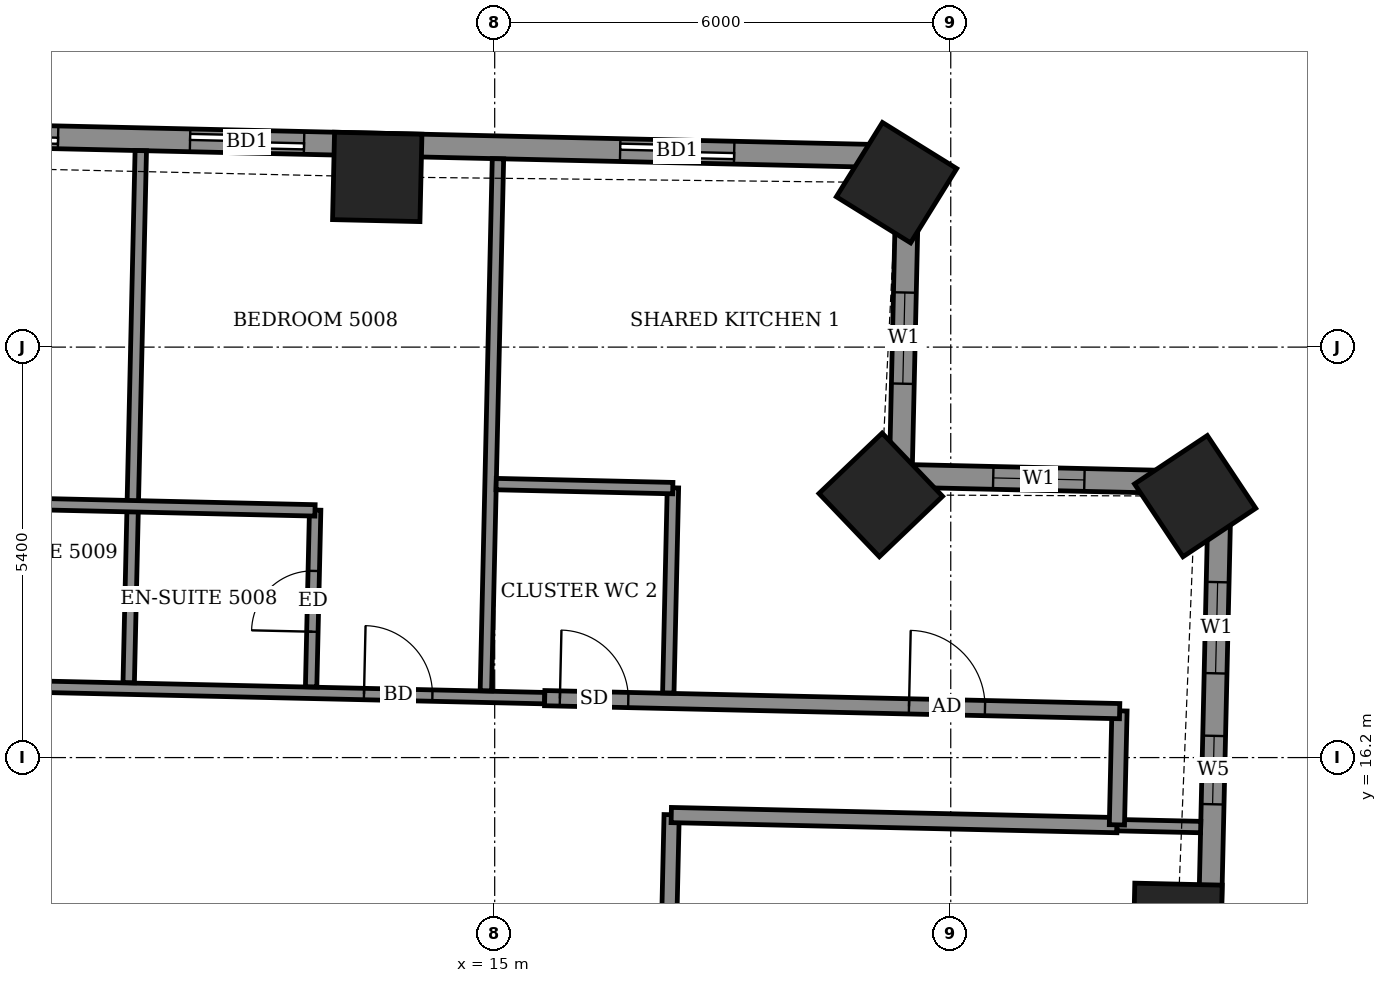
"""IFC4 building model, lengths in metres.
Left out: names, types, materials, properties, quantities, classifications, styles, units other than length and angle.
Written with IfcOpenShell. Run it as: python <this file> out.ifc"""

import sys

from ifc_helpers import new_model, si_unit, direction, frame, frame_2d, origin, origin_2d, place, context, subcontext, project, spatial, rectangle, extrude, element, fill, save


model = new_model("IFC4")
c1 = context("Model", 3, precision=1e-05, world=origin(), true_north=direction((0.0, 1.0)))
c2 = subcontext(c1, "Body", "Model", "MODEL_VIEW")
j1 = project(units=[si_unit("LENGTHUNIT", "METRE"), si_unit("PLANEANGLEUNIT", "RADIAN")], contexts=[c1])
p1 = place(None, origin())
s1 = spatial("IfcSite", under=j1, at=p1, CompositionType="ELEMENT")
p2 = place(p1, origin())
s2 = spatial("IfcBuilding", under=s1, at=p2, CompositionType="ELEMENT")
p3 = place(p2, frame((0.0, 0.0, 197.9)))
s3 = spatial("IfcBuildingStorey", under=s2, at=p3, CompositionType="ELEMENT", Elevation=197.9)
for number, where, z_axis, x_axis in (
    (1, (23.983, 13.96, -0.55), (0.0, 0.0, 1.0), (0.023, 1.0, 0.0)),
    (2, (24.215, 19.639, -0.55), (0.0, 0.0, 1.0), (-0.554, 0.833, 0.0)),
    (3, (20.079, 19.656, -0.55), (0.0, 0.0, 1.0), (-0.691, 0.723, 0.0)),
    (4, (20.287, 23.763, -0.55), (0.0, 0.0, 1.0), (-0.85, 0.527, 0.0)),
    (5, (13.455, 23.839, -0.55), (0.0, 0.0, 1.0), (-1.0, 0.023, 0.0)),
):
    element("IfcColumn", number, at=place(p3, frame(where, z_axis=z_axis, x_axis=x_axis)), inside=s3, PredefinedType="COLUMN", context=c2, shape_type="SweptSolid", body=[
        extrude(rectangle(XDim=1.15, YDim=1.15, at=origin_2d()), origin(), (0.0, 0.0, 1.0), 3.6),
    ])
p4 = place(p3, frame((24.27, 7.885, 0.0), z_axis=(0.0, 0.0, 1.0), x_axis=(0.022715362207, 0.999741972871, 0.0)))
e6 = element("IfcWall", 6, at=p4, inside=s3, PredefinedType="SOLIDWALL", context=c2, shape_type="SweptSolid", body=[
    extrude(rectangle(XDim=11.93, YDim=0.3, at=frame_2d((5.965, 0.0))), origin(), (0.0, 0.0, 1.0), 3.05),
])
p5 = place(p4, frame((2.311, 0.0, 0.0)))
e7 = element("IfcOpeningElement", 7, at=p5, cuts=e6, PredefinedType="OPENING", context=c2, shape_type="SweptSolid", body=[
    extrude(rectangle(XDim=1.5, YDim=2.4, at=frame_2d((0.75, 1.2))), frame((0.0, 0.16, 0.0), z_axis=(0.0, -1.0, 0.0), x_axis=(1.0, 0.0, 0.0)), (0.0, 0.0, 1.0), 0.32),
])
p6 = place(p4, frame((7.703, 0.0, 0.9)))
e8 = element("IfcOpeningElement", 8, at=p6, cuts=e6, PredefinedType="OPENING", context=c2, shape_type="SweptSolid", body=[
    extrude(rectangle(XDim=0.9, YDim=1.5, at=frame_2d((0.45, 0.75))), frame((0.0, 0.16, 0.0), z_axis=(0.0, -1.0, 0.0), x_axis=(1.0, 0.0, 0.0)), (0.0, 0.0, 1.0), 0.32),
])
p7 = place(p4, frame((9.426, 0.0, 0.9)))
e9 = element("IfcOpeningElement", 9, at=p7, cuts=e6, PredefinedType="OPENING", context=c2, shape_type="SweptSolid", body=[
    extrude(rectangle(XDim=1.2, YDim=1.5, at=frame_2d((0.6, 0.75))), frame((0.0, 0.16, 0.0), z_axis=(0.0, -1.0, 0.0), x_axis=(1.0, 0.0, 0.0)), (0.0, 0.0, 1.0), 0.32),
])
p8 = place(p3, frame((24.541, 19.812, 0.0), z_axis=(0.0, 0.0, 1.0), x_axis=(-0.999744320311, 0.022611811187, 0.0)))
e10 = element("IfcWall", 10, at=p8, inside=s3, PredefinedType="SOLIDWALL", context=c2, shape_type="SweptSolid", body=[
    extrude(rectangle(XDim=4.2, YDim=0.3, at=frame_2d((2.1, 0.0))), origin(), (0.0, 0.0, 1.0), 2.55),
])
p9 = place(p8, frame((1.783, 0.0, 0.9)))
e11 = element("IfcOpeningElement", 11, at=p9, cuts=e10, PredefinedType="OPENING", context=c2, shape_type="SweptSolid", body=[
    extrude(rectangle(XDim=1.2, YDim=1.5, at=frame_2d((0.6, 0.75))), frame((0.0, 0.16, 0.0), z_axis=(0.0, -1.0, 0.0), x_axis=(1.0, 0.0, 0.0)), (0.0, 0.0, 1.0), 0.32),
])
p10 = place(p3, frame((20.342, 19.907, 0.0), z_axis=(0.0, 0.0, 1.0), x_axis=(0.022611811187, 0.999744320311, 0.0)))
e12 = element("IfcWall", 12, at=p10, inside=s3, PredefinedType="SOLIDWALL", context=c2, shape_type="SweptSolid", body=[
    extrude(rectangle(XDim=4.2, YDim=0.3, at=frame_2d((2.1, 0.0))), origin(), (0.0, 0.0, 1.0), 2.55),
])
p11 = place(p10, frame((1.212, 0.0, 0.9)))
e13 = element("IfcOpeningElement", 13, at=p11, cuts=e12, PredefinedType="OPENING", context=c2, shape_type="SweptSolid", body=[
    extrude(rectangle(XDim=1.2, YDim=1.5, at=frame_2d((0.6, 0.75))), frame((0.0, 0.16, 0.0), z_axis=(0.0, -1.0, 0.0), x_axis=(1.0, 0.0, 0.0)), (0.0, 0.0, 1.0), 0.32),
])
p12 = place(p3, frame((20.437, 24.106, 0.0), z_axis=(0.0, 0.0, 1.0), x_axis=(-0.999742506232, 0.022691875925, 0.0)))
e14 = element("IfcWall", 14, at=p12, inside=s3, PredefinedType="SOLIDWALL", context=c2, shape_type="SweptSolid", body=[
    extrude(rectangle(XDim=42.444, YDim=0.3, at=frame_2d((21.222, 0.0))), origin(), (0.0, 0.0, 1.0), 3.05),
])
p13 = place(p12, frame((2.287, 0.0, 0.0)))
e15 = element("IfcOpeningElement", 15, at=p13, cuts=e14, PredefinedType="OPENING", context=c2, shape_type="SweptSolid", body=[
    extrude(rectangle(XDim=1.5, YDim=2.4, at=frame_2d((0.75, 1.2))), frame((0.0, 0.16, 0.0), z_axis=(0.0, -1.0, 0.0), x_axis=(1.0, 0.0, 0.0)), (0.0, 0.0, 1.0), 0.32),
])
p14 = place(p12, frame((7.947, 0.0, 0.0)))
e16 = element("IfcOpeningElement", 16, at=p14, cuts=e14, PredefinedType="OPENING", context=c2, shape_type="SweptSolid", body=[
    extrude(rectangle(XDim=1.5, YDim=2.4, at=frame_2d((0.75, 1.2))), frame((0.0, 0.16, 0.0), z_axis=(0.0, -1.0, 0.0), x_axis=(1.0, 0.0, 0.0)), (0.0, 0.0, 1.0), 0.32),
])
p15 = place(p12, frame((11.184, 0.0, 0.0)))
e17 = element("IfcOpeningElement", 17, at=p15, cuts=e14, PredefinedType="OPENING", context=c2, shape_type="SweptSolid", body=[
    extrude(rectangle(XDim=1.5, YDim=2.4, at=frame_2d((0.75, 1.2))), frame((0.0, 0.16, 0.0), z_axis=(0.0, -1.0, 0.0), x_axis=(1.0, 0.0, 0.0)), (0.0, 0.0, 1.0), 0.32),
])
p16 = place(p12, frame((16.469, 0.0, 0.0)))
e18 = element("IfcOpeningElement", 18, at=p16, cuts=e14, PredefinedType="OPENING", context=c2, shape_type="SweptSolid", body=[
    extrude(rectangle(XDim=1.5, YDim=2.4, at=frame_2d((0.75, 1.2))), frame((0.0, 0.16, 0.0), z_axis=(0.0, -1.0, 0.0), x_axis=(1.0, 0.0, 0.0)), (0.0, 0.0, 1.0), 0.32),
])
p17 = place(p12, frame((22.02, 0.0, 0.0)))
e19 = element("IfcOpeningElement", 19, at=p17, cuts=e14, PredefinedType="OPENING", context=c2, shape_type="SweptSolid", body=[
    extrude(rectangle(XDim=1.5, YDim=2.4, at=frame_2d((0.75, 1.2))), frame((0.0, 0.16, 0.0), z_axis=(0.0, -1.0, 0.0), x_axis=(1.0, 0.0, 0.0)), (0.0, 0.0, 1.0), 0.32),
])
p18 = place(p12, frame((25.257, 0.0, 0.0)))
e20 = element("IfcOpeningElement", 20, at=p18, cuts=e14, PredefinedType="OPENING", context=c2, shape_type="SweptSolid", body=[
    extrude(rectangle(XDim=1.5, YDim=2.4, at=frame_2d((0.75, 1.2))), frame((0.0, 0.16, 0.0), z_axis=(0.0, -1.0, 0.0), x_axis=(1.0, 0.0, 0.0)), (0.0, 0.0, 1.0), 0.32),
])
p19 = place(p12, frame((30.057, 0.0, 0.0)))
e21 = element("IfcOpeningElement", 21, at=p19, cuts=e14, PredefinedType="OPENING", context=c2, shape_type="SweptSolid", body=[
    extrude(rectangle(XDim=1.5, YDim=2.4, at=frame_2d((0.75, 1.2))), frame((0.0, 0.16, 0.0), z_axis=(0.0, -1.0, 0.0), x_axis=(1.0, 0.0, 0.0)), (0.0, 0.0, 1.0), 0.32),
])
p20 = place(p12, frame((33.294, 0.0, 0.0)))
e22 = element("IfcOpeningElement", 22, at=p20, cuts=e14, PredefinedType="OPENING", context=c2, shape_type="SweptSolid", body=[
    extrude(rectangle(XDim=1.5, YDim=2.4, at=frame_2d((0.75, 1.2))), frame((0.0, 0.16, 0.0), z_axis=(0.0, -1.0, 0.0), x_axis=(1.0, 0.0, 0.0)), (0.0, 0.0, 1.0), 0.32),
])
p21 = place(p12, frame((38.484, 0.0, 0.9)))
e23 = element("IfcOpeningElement", 23, at=p21, cuts=e14, PredefinedType="OPENING", context=c2, shape_type="SweptSolid", body=[
    extrude(rectangle(XDim=2.4, YDim=1.5, at=frame_2d((1.2, 0.75))), frame((0.0, 0.16, 0.0), z_axis=(0.0, -1.0, 0.0), x_axis=(1.0, 0.0, 0.0)), (0.0, 0.0, 1.0), 0.32),
])
p22 = place(p3, frame((17.154, 7.786, 0.0), z_axis=(0.0, 0.0, 1.0), x_axis=(0.022680883318, 0.999742755679, 0.0)))
e24 = element("IfcWall", 24, at=p22, inside=s3, PredefinedType="PARTITIONING", context=c2, shape_type="SweptSolid", body=[
    extrude(rectangle(XDim=7.664, YDim=0.2, at=frame_2d((3.832, 0.0))), origin(), (0.0, 0.0, 1.0), 3.05),
])
p23 = place(p22, frame((3.434, 0.0, 0.0)))
e25 = element("IfcOpeningElement", 25, at=p23, cuts=e24, PredefinedType="OPENING", context=c2, shape_type="SweptSolid", body=[
    extrude(rectangle(XDim=1.0, YDim=2.1, at=frame_2d((0.5, 1.05))), frame((0.0, 0.11, 0.0), z_axis=(0.0, -1.0, 0.0), x_axis=(1.0, 0.0, 0.0)), (0.0, 0.0, 1.0), 0.22),
])
p24 = place(p3, frame((17.323, 15.444, 0.0), z_axis=(0.0, 0.0, 1.0), x_axis=(0.999742758565, -0.022680756085, 0.0)))
e26 = element("IfcWall", 26, at=p24, inside=s3, PredefinedType="PARTITIONING", context=c2, shape_type="SweptSolid", body=[
    extrude(rectangle(XDim=5.866, YDim=0.2, at=frame_2d((2.933, 0.0))), origin(), (0.0, 0.0, 1.0), 3.05),
])
p25 = place(p3, frame((23.188, 15.311, 0.0), z_axis=(0.0, 0.0, 1.0), x_axis=(0.999738848859, -0.022852441507, 0.0)))
e27 = element("IfcWall", 27, at=p25, inside=s3, PredefinedType="PARTITIONING", context=c2, shape_type="SweptSolid", body=[
    extrude(rectangle(XDim=1.1, YDim=0.15, at=frame_2d((0.55, 0.0))), origin(), (0.0, 0.0, 1.0), 2.55),
])
p26 = place(p3, frame((23.186, 15.315, 0.0), z_axis=(0.0, 0.0, 1.0), x_axis=(0.022617910375, 0.999744182344, 0.0)))
e28 = element("IfcWall", 28, at=p26, inside=s3, PredefinedType="PARTITIONING", context=c2, shape_type="SweptSolid", body=[
    extrude(rectangle(XDim=1.5, YDim=0.2, at=frame_2d((0.75, 0.0))), origin(), (0.0, 0.0, 1.0), 3.05),
])
p27 = place(p3, frame((-14.871, 17.675, 0.0), z_axis=(0.0, 0.0, 1.0), x_axis=(0.999742359486, -0.02269834024, 0.0)))
e29 = element("IfcWall", 29, at=p27, inside=s3, PredefinedType="PARTITIONING", context=c2, shape_type="SweptSolid", body=[
    extrude(rectangle(XDim=30.536, YDim=0.15, at=frame_2d((15.268, 0.0))), origin(), (0.0, 0.0, 1.0), 3.05),
])
p28 = place(p27, frame((28.159, 0.0, 0.0)))
e30 = element("IfcOpeningElement", 30, at=p28, cuts=e29, PredefinedType="OPENING", context=c2, shape_type="SweptSolid", body=[
    extrude(rectangle(XDim=0.9, YDim=2.1, at=frame_2d((0.45, 1.05))), frame((0.0, 0.085, 0.0), z_axis=(0.0, -1.0, 0.0), x_axis=(1.0, 0.0, 0.0)), (0.0, 0.0, 1.0), 0.17),
])
p29 = place(p27, frame((21.034, 0.0, 0.0)))
e31 = element("IfcOpeningElement", 31, at=p29, cuts=e29, PredefinedType="OPENING", context=c2, shape_type="SweptSolid", body=[
    extrude(rectangle(XDim=0.9, YDim=2.1, at=frame_2d((0.45, 1.05))), frame((0.0, 0.085, 0.0), z_axis=(0.0, -1.0, 0.0), x_axis=(1.0, 0.0, 0.0)), (0.0, 0.0, 1.0), 0.17),
])
p30 = place(p27, frame((18.684, 0.0, 0.0)))
e32 = element("IfcOpeningElement", 32, at=p30, cuts=e29, PredefinedType="OPENING", context=c2, shape_type="SweptSolid", body=[
    extrude(rectangle(XDim=0.9, YDim=2.1, at=frame_2d((0.45, 1.05))), frame((0.0, 0.085, 0.0), z_axis=(0.0, -1.0, 0.0), x_axis=(1.0, 0.0, 0.0)), (0.0, 0.0, 1.0), 0.17),
])
p31 = place(p27, frame((11.709, 0.0, 0.0)))
e33 = element("IfcOpeningElement", 33, at=p31, cuts=e29, PredefinedType="OPENING", context=c2, shape_type="SweptSolid", body=[
    extrude(rectangle(XDim=0.9, YDim=2.1, at=frame_2d((0.45, 1.05))), frame((0.0, 0.085, 0.0), z_axis=(0.0, -1.0, 0.0), x_axis=(1.0, 0.0, 0.0)), (0.0, 0.0, 1.0), 0.17),
])
p32 = place(p27, frame((9.734, 0.0, 0.0)))
e34 = element("IfcOpeningElement", 34, at=p32, cuts=e29, PredefinedType="OPENING", context=c2, shape_type="SweptSolid", body=[
    extrude(rectangle(XDim=0.9, YDim=2.1, at=frame_2d((0.45, 1.05))), frame((0.0, 0.085, 0.0), z_axis=(0.0, -1.0, 0.0), x_axis=(1.0, 0.0, 0.0)), (0.0, 0.0, 1.0), 0.17),
])
p33 = place(p27, frame((2.859, 0.0, 0.0)))
e35 = element("IfcOpeningElement", 35, at=p33, cuts=e29, PredefinedType="OPENING", context=c2, shape_type="SweptSolid", body=[
    extrude(rectangle(XDim=0.9, YDim=2.1, at=frame_2d((0.45, 1.05))), frame((0.0, 0.085, 0.0), z_axis=(0.0, -1.0, 0.0), x_axis=(1.0, 0.0, 0.0)), (0.0, 0.0, 1.0), 0.17),
])
p34 = place(p27, frame((0.584, 0.0, 0.0)))
e36 = element("IfcOpeningElement", 36, at=p34, cuts=e29, PredefinedType="OPENING", context=c2, shape_type="SweptSolid", body=[
    extrude(rectangle(XDim=0.9, YDim=2.1, at=frame_2d((0.45, 1.05))), frame((0.0, 0.085, 0.0), z_axis=(0.0, -1.0, 0.0), x_axis=(1.0, 0.0, 0.0)), (0.0, 0.0, 1.0), 0.17),
])
p35 = place(p3, frame((15.658, 16.982, 0.0), z_axis=(0.0, 0.0, 1.0), x_axis=(0.99974485859, -0.022587999516, 0.0)))
e37 = element("IfcWall", 37, at=p35, inside=s3, PredefinedType="PARTITIONING", context=c2, shape_type="SweptSolid", body=[
    extrude(rectangle(XDim=7.566, YDim=0.2, at=frame_2d((3.783, 0.0))), origin(), (0.0, 0.0, 1.0), 3.05),
])
p36 = place(p35, frame((4.794, 0.0, 0.0)))
e38 = element("IfcOpeningElement", 38, at=p36, cuts=e37, PredefinedType="OPENING", context=c2, shape_type="SweptSolid", body=[
    extrude(rectangle(XDim=1.0, YDim=2.1, at=frame_2d((0.5, 1.05))), frame((0.0, 0.11, 0.0), z_axis=(0.0, -1.0, 0.0), x_axis=(1.0, 0.0, 0.0)), (0.0, 0.0, 1.0), 0.22),
])
p37 = place(p35, frame((0.2, 0.0, 0.0)))
e39 = element("IfcOpeningElement", 39, at=p37, cuts=e37, PredefinedType="OPENING", context=c2, shape_type="SweptSolid", body=[
    extrude(rectangle(XDim=0.9, YDim=2.1, at=frame_2d((0.45, 1.05))), frame((0.0, 0.11, 0.0), z_axis=(0.0, -1.0, 0.0), x_axis=(1.0, 0.0, 0.0)), (0.0, 0.0, 1.0), 0.22),
])
p38 = place(p3, frame((10.185, 17.186, 0.0), z_axis=(0.0, 0.0, 1.0), x_axis=(0.022702393474, 0.999742267452, 0.0)))
e40 = element("IfcWall", 40, at=p38, inside=s3, PredefinedType="PARTITIONING", context=c2, shape_type="SweptSolid", body=[
    extrude(rectangle(XDim=7.001, YDim=0.15, at=frame_2d((3.5, 0.0))), origin(), (0.0, 0.0, 1.0), 2.55),
])
p39 = place(p3, frame((12.585, 17.131, 0.0), z_axis=(0.0, 0.0, 1.0), x_axis=(0.022781023197, 0.999740478815, 0.0)))
e41 = element("IfcWall", 41, at=p39, inside=s3, PredefinedType="PARTITIONING", context=c2, shape_type="SweptSolid", body=[
    extrude(rectangle(XDim=2.325, YDim=0.15, at=frame_2d((1.163, 0.0))), origin(), (0.0, 0.0, 1.0), 3.05),
])
p40 = place(p39, frame((0.725, 0.0, 0.0)))
e42 = element("IfcOpeningElement", 42, at=p40, cuts=e41, PredefinedType="OPENING", context=c2, shape_type="SweptSolid", body=[
    extrude(rectangle(XDim=0.8, YDim=2.1, at=frame_2d((0.4, 1.05))), frame((0.0, 0.085, 0.0), z_axis=(0.0, -1.0, 0.0), x_axis=(1.0, 0.0, 0.0)), (0.0, 0.0, 1.0), 0.17),
])
p41 = place(p3, frame((14.884, 17.079, 0.0), z_axis=(0.0, 0.0, 1.0), x_axis=(0.022703185001, 0.999742249478, 0.0)))
e43 = element("IfcWall", 43, at=p41, inside=s3, PredefinedType="PARTITIONING", context=c2, shape_type="SweptSolid", body=[
    extrude(rectangle(XDim=7.0, YDim=0.15, at=frame_2d((3.5, 0.0))), origin(), (0.0, 0.0, 1.0), 2.55),
])
p42 = place(p3, frame((17.284, 17.05, 0.0), z_axis=(0.0, 0.0, 1.0), x_axis=(0.02260842146, 0.999744396973, 0.0)))
e44 = element("IfcWall", 44, at=p42, inside=s3, PredefinedType="PARTITIONING", context=c2, shape_type="SweptSolid", body=[
    extrude(rectangle(XDim=2.7, YDim=0.15, at=frame_2d((1.35, 0.0))), origin(), (0.0, 0.0, 1.0), 3.05),
])
p43 = place(p3, frame((7.837, 19.561, 0.0), z_axis=(0.0, 0.0, 1.0), x_axis=(0.99974154664, -0.022734113616, 0.0)))
e45 = element("IfcWall", 45, at=p43, inside=s3, PredefinedType="PARTITIONING", context=c2, shape_type="SweptSolid", body=[
    extrude(rectangle(XDim=4.8, YDim=0.15, at=frame_2d((2.4, 0.0))), origin(), (0.0, 0.0, 1.0), 3.05),
])
p44 = place(p3, frame((15.019, 19.798, 0.0), z_axis=(0.0, 0.0, 1.0), x_axis=(0.999740260747, -0.02279059109, 0.0)))
e46 = element("IfcWall", 46, at=p44, inside=s3, PredefinedType="PARTITIONING", context=c2, shape_type="SweptSolid", body=[
    extrude(rectangle(XDim=2.324, YDim=0.15, at=frame_2d((1.162, 0.0))), origin(), (0.0, 0.0, 1.0), 3.05),
])
p45 = place(p6, origin())
e47 = element("IfcWindow", 47, at=p45, inside=s3, PartitioningType="SINGLE_PANEL", PredefinedType="WINDOW", context=c2, shape_type="SweptSolid", body=[
    extrude(rectangle(XDim=0.9, YDim=1.5, at=frame_2d((0.45, 0.75))), frame((0.0, 0.03, 0.0), z_axis=(0.0, -1.0, 0.0), x_axis=(1.0, 0.0, 0.0)), (0.0, 0.0, 1.0), 0.06),
])
fill(e8, e47)
p46 = place(p7, origin())
e48 = element("IfcWindow", 48, at=p46, inside=s3, PartitioningType="SINGLE_PANEL", PredefinedType="WINDOW", context=c2, shape_type="SweptSolid", body=[
    extrude(rectangle(XDim=1.2, YDim=1.5, at=frame_2d((0.6, 0.75))), frame((0.0, 0.03, 0.0), z_axis=(0.0, -1.0, 0.0), x_axis=(1.0, 0.0, 0.0)), (0.0, 0.0, 1.0), 0.06),
])
fill(e9, e48)
p47 = place(p9, origin())
e49 = element("IfcWindow", 49, at=p47, inside=s3, PartitioningType="SINGLE_PANEL", PredefinedType="WINDOW", context=c2, shape_type="SweptSolid", body=[
    extrude(rectangle(XDim=1.2, YDim=1.5, at=frame_2d((0.6, 0.75))), frame((0.0, 0.03, 0.0), z_axis=(0.0, -1.0, 0.0), x_axis=(1.0, 0.0, 0.0)), (0.0, 0.0, 1.0), 0.06),
])
fill(e11, e49)
p48 = place(p11, origin())
e50 = element("IfcWindow", 50, at=p48, inside=s3, PartitioningType="SINGLE_PANEL", PredefinedType="WINDOW", context=c2, shape_type="SweptSolid", body=[
    extrude(rectangle(XDim=1.2, YDim=1.5, at=frame_2d((0.6, 0.75))), frame((0.0, 0.03, 0.0), z_axis=(0.0, -1.0, 0.0), x_axis=(1.0, 0.0, 0.0)), (0.0, 0.0, 1.0), 0.06),
])
fill(e13, e50)
p49 = place(p13, origin())
e51 = element("IfcDoor", 51, at=p49, inside=s3, OperationType="SLIDING_TO_LEFT", PredefinedType="DOOR", context=c2, shape_type="SweptSolid", body=[
    extrude(rectangle(XDim=1.5, YDim=2.4, at=frame_2d((0.75, 1.2))), frame((0.0, 0.025, 0.0), z_axis=(0.0, -1.0, 0.0), x_axis=(1.0, 0.0, 0.0)), (0.0, 0.0, 1.0), 0.05),
])
fill(e15, e51)
p50 = place(p14, origin())
e52 = element("IfcDoor", 52, at=p50, inside=s3, OperationType="SLIDING_TO_LEFT", PredefinedType="DOOR", context=c2, shape_type="SweptSolid", body=[
    extrude(rectangle(XDim=1.5, YDim=2.4, at=frame_2d((0.75, 1.2))), frame((0.0, 0.025, 0.0), z_axis=(0.0, -1.0, 0.0), x_axis=(1.0, 0.0, 0.0)), (0.0, 0.0, 1.0), 0.05),
])
fill(e16, e52)
p51 = place(p15, origin())
e53 = element("IfcDoor", 53, at=p51, inside=s3, OperationType="SLIDING_TO_LEFT", PredefinedType="DOOR", context=c2, shape_type="SweptSolid", body=[
    extrude(rectangle(XDim=1.5, YDim=2.4, at=frame_2d((0.75, 1.2))), frame((0.0, 0.025, 0.0), z_axis=(0.0, -1.0, 0.0), x_axis=(1.0, 0.0, 0.0)), (0.0, 0.0, 1.0), 0.05),
])
fill(e17, e53)
p52 = place(p36, origin())
e54 = element("IfcDoor", 54, at=p52, inside=s3, OperationType="SINGLE_SWING_LEFT", PredefinedType="DOOR", context=c2, shape_type="SweptSolid", body=[
    extrude(rectangle(XDim=1.0, YDim=2.1, at=frame_2d((0.5, 1.05))), frame((0.0, 0.025, 0.0), z_axis=(0.0, -1.0, 0.0), x_axis=(1.0, 0.0, 0.0)), (0.0, 0.0, 1.0), 0.05),
])
fill(e38, e54)
p53 = place(p37, origin())
e55 = element("IfcDoor", 55, at=p53, inside=s3, OperationType="SINGLE_SWING_LEFT", PredefinedType="DOOR", context=c2, shape_type="SweptSolid", body=[
    extrude(rectangle(XDim=0.9, YDim=2.1, at=frame_2d((0.45, 1.05))), frame((0.0, 0.025, 0.0), z_axis=(0.0, -1.0, 0.0), x_axis=(1.0, 0.0, 0.0)), (0.0, 0.0, 1.0), 0.05),
])
fill(e39, e55)
p54 = place(p28, origin())
e56 = element("IfcDoor", 56, at=p54, inside=s3, OperationType="SINGLE_SWING_RIGHT", PredefinedType="DOOR", context=c2, shape_type="SweptSolid", body=[
    extrude(rectangle(XDim=0.9, YDim=2.1, at=frame_2d((0.45, 1.05))), frame((0.0, 0.025, 0.0), z_axis=(0.0, -1.0, 0.0), x_axis=(1.0, 0.0, 0.0)), (0.0, 0.0, 1.0), 0.05),
])
fill(e30, e56)
p55 = place(p40, origin())
e57 = element("IfcDoor", 57, at=p55, inside=s3, OperationType="SINGLE_SWING_RIGHT", PredefinedType="DOOR", context=c2, shape_type="SweptSolid", body=[
    extrude(rectangle(XDim=0.8, YDim=2.1, at=frame_2d((0.4, 1.05))), frame((0.0, 0.025, 0.0), z_axis=(0.0, -1.0, 0.0), x_axis=(1.0, 0.0, 0.0)), (0.0, 0.0, 1.0), 0.05),
])
fill(e42, e57)
save(model, sys.argv[1])
